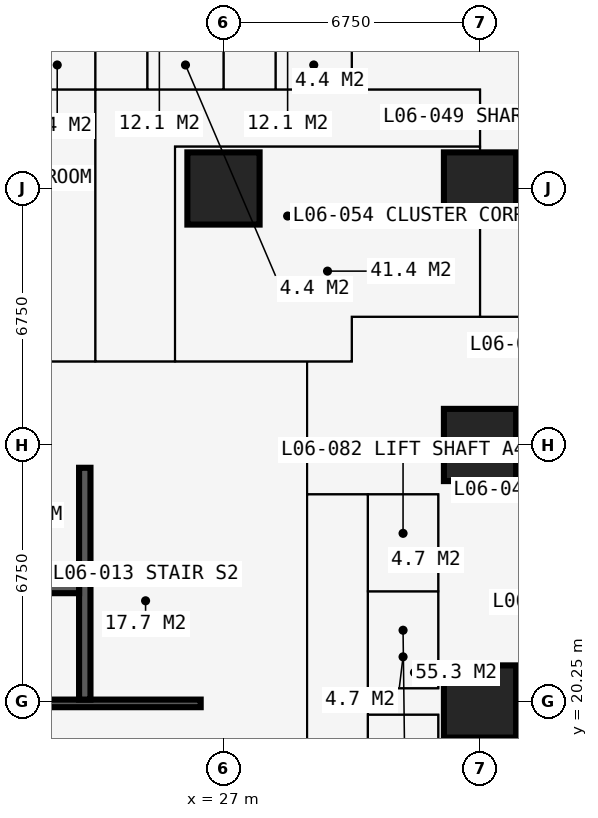
"""IFC4 building model, lengths in metres.
Left out: names, types, materials, properties, quantities, classifications, styles, units other than length and angle.
Written with IfcOpenShell. Run it as: python <this file> out.ifc"""

import sys

from ifc_helpers import new_model, si_unit, direction, frame, frame_2d, origin, origin_2d, place, context, subcontext, project, spatial, rectangle, extrude, element, fill, save


model = new_model("IFC4")
c1 = context("Model", 3, precision=1e-05, world=origin(), true_north=direction((0.0, 1.0)))
c2 = subcontext(c1, "Body", "Model", "MODEL_VIEW")
j1 = project(units=[si_unit("LENGTHUNIT", "METRE"), si_unit("PLANEANGLEUNIT", "RADIAN")], contexts=[c1])
p1 = place(None, origin())
s1 = spatial("IfcSite", under=j1, at=p1, CompositionType="ELEMENT")
p2 = place(p1, origin())
s2 = spatial("IfcBuilding", under=s1, at=p2, CompositionType="ELEMENT")
p3 = place(p2, frame((0.0, 0.0, 25.2)))
s3 = spatial("IfcBuildingStorey", under=s2, at=p3, CompositionType="ELEMENT", Elevation=25.2)
for number, where, z_axis, x_axis in (
    (1, (27.0, 33.75, 0.0), (0.0, 0.0, 1.0), (1.0, 0.0, 0.0)),
    (2, (33.75, 20.25, 0.0), (0.0, 0.0, 1.0), (1.0, 0.0, 0.0)),
    (3, (33.75, 27.0, 0.0), (0.0, 0.0, 1.0), (1.0, 0.0, 0.0)),
    (4, (33.75, 33.75, 0.0), (0.0, 0.0, 1.0), (1.0, 0.0, 0.0)),
):
    element("IfcColumn", number, at=place(p3, frame(where, z_axis=z_axis, x_axis=x_axis)), inside=s3, PredefinedType="COLUMN", context=c2, shape_type="SweptSolid", body=[
        extrude(rectangle(XDim=1.9, YDim=1.9, at=origin_2d()), origin(), (0.0, 0.0, 1.0), 3.6),
    ])
p4 = place(p3, frame((27.0, 14.1, 0.0), z_axis=(0.0, 0.0, 1.0), x_axis=(0.0, 1.0, 0.0)))
e5 = element("IfcWall", 5, at=p4, inside=s3, PredefinedType="SHEAR", context=c2, shape_type="SweptSolid", body=[
    extrude(rectangle(XDim=12.3, YDim=1.2, at=frame_2d((6.15, 0.0))), origin(), (0.0, 0.0, 1.0), 3.6),
])
p5 = place(p4, frame((3.65, 0.0, 0.0)))
e6 = element("IfcOpeningElement", 6, at=p5, cuts=e5, PredefinedType="OPENING", context=c2, shape_type="SweptSolid", body=[
    extrude(rectangle(XDim=1.2, YDim=2.2, at=frame_2d((0.6, 1.1))), frame((0.0, 0.61, 0.0), z_axis=(0.0, -1.0, 0.0), x_axis=(1.0, 0.0, 0.0)), (0.0, 0.0, 1.0), 1.22),
])
p6 = place(p3, frame((27.6, 27.0, 0.0), z_axis=(0.0, 0.0, 1.0), x_axis=(-1.0, 0.0, 0.0)))
e7 = element("IfcWall", 7, at=p6, inside=s3, PredefinedType="SHEAR", context=c2, shape_type="SweptSolid", body=[
    extrude(rectangle(XDim=14.7, YDim=1.2, at=frame_2d((7.35, 0.0))), origin(), (0.0, 0.0, 1.0), 3.6),
])
p7 = place(p6, frame((5.225, 0.0, 0.0)))
e8 = element("IfcOpeningElement", 8, at=p7, cuts=e7, PredefinedType="OPENING", context=c2, shape_type="SweptSolid", body=[
    extrude(rectangle(XDim=0.9, YDim=2.2, at=frame_2d((0.45, 1.1))), frame((0.0, 0.61, 0.0), z_axis=(0.0, -1.0, 0.0), x_axis=(1.0, 0.0, 0.0)), (0.0, 0.0, 1.0), 1.22),
])
p8 = place(p6, frame((8.2, 0.0, 0.0)))
e9 = element("IfcOpeningElement", 9, at=p8, cuts=e7, PredefinedType="OPENING", context=c2, shape_type="SweptSolid", body=[
    extrude(rectangle(XDim=1.0, YDim=2.2, at=frame_2d((0.5, 1.1))), frame((0.0, 0.61, 0.0), z_axis=(0.0, -1.0, 0.0), x_axis=(1.0, 0.0, 0.0)), (0.0, 0.0, 1.0), 1.22),
])
p9 = place(p3, frame((14.1, 20.2, 0.0), z_axis=(0.0, 0.0, 1.0), x_axis=(1.0, 0.0, 0.0)))
e10 = element("IfcWall", 10, at=p9, inside=s3, PredefinedType="SHEAR", context=c2, shape_type="SweptSolid", body=[
    extrude(rectangle(XDim=12.3, YDim=0.2, at=frame_2d((6.15, 0.0))), origin(), (0.0, 0.0, 1.0), 3.6),
])
p10 = place(p9, frame((0.35, 0.0, 0.0)))
e11 = element("IfcOpeningElement", 11, at=p10, cuts=e10, PredefinedType="OPENING", context=c2, shape_type="SweptSolid", body=[
    extrude(rectangle(XDim=1.1, YDim=2.2, at=frame_2d((0.55, 1.1))), frame((0.0, 0.11, 0.0), z_axis=(0.0, -1.0, 0.0), x_axis=(1.0, 0.0, 0.0)), (0.0, 0.0, 1.0), 0.22),
])
p11 = place(p9, frame((9.75, 0.0, 0.0)))
e12 = element("IfcOpeningElement", 12, at=p11, cuts=e10, PredefinedType="OPENING", context=c2, shape_type="SweptSolid", body=[
    extrude(rectangle(XDim=1.1, YDim=2.2, at=frame_2d((0.55, 1.1))), frame((0.0, 0.11, 0.0), z_axis=(0.0, -1.0, 0.0), x_axis=(1.0, 0.0, 0.0)), (0.0, 0.0, 1.0), 0.22),
])
p12 = place(p3, frame((23.35, 20.3, 0.0), z_axis=(0.0, 0.0, 1.0), x_axis=(0.0, 1.0, 0.0)))
e13 = element("IfcWall", 13, at=p12, inside=s3, PredefinedType="SHEAR", context=c2, shape_type="SweptSolid", body=[
    extrude(rectangle(XDim=6.1, YDim=0.3, at=frame_2d((3.05, 0.0))), origin(), (0.0, 0.0, 1.0), 3.6),
])
p13 = place(p3, frame((17.3, 23.25, 0.0), z_axis=(0.0, 0.0, 1.0), x_axis=(1.0, 0.0, 0.0)))
e14 = element("IfcWall", 14, at=p13, inside=s3, PredefinedType="SHEAR", context=c2, shape_type="SweptSolid", body=[
    extrude(rectangle(XDim=5.9, YDim=0.3, at=frame_2d((2.95, 0.0))), origin(), (0.0, 0.0, 1.0), 3.6),
])
p14 = place(p3, frame((10.125, 36.35, 0.0), z_axis=(0.0, 0.0, 1.0), x_axis=(1.0, 0.0, 0.0)))
e15 = element("IfcWall", 15, at=p14, inside=s3, PredefinedType="PARTITIONING", context=c2, shape_type="SweptSolid", body=[
    extrude(rectangle(XDim=23.625, YDim=0.1, at=frame_2d((11.812, 0.0))), origin(), (0.0, 0.0, 1.0), 3.375),
])
p15 = place(p14, frame((21.45, 0.0, 0.0)))
e16 = element("IfcOpeningElement", 16, at=p15, cuts=e15, PredefinedType="OPENING", context=c2, shape_type="SweptSolid", body=[
    extrude(rectangle(XDim=1.0, YDim=2.2, at=frame_2d((0.5, 1.1))), frame((0.0, 0.06, 0.0), z_axis=(0.0, -1.0, 0.0), x_axis=(1.0, 0.0, 0.0)), (0.0, 0.0, 1.0), 0.12),
])
p16 = place(p14, frame((17.125, 0.0, 0.0)))
e17 = element("IfcOpeningElement", 17, at=p16, cuts=e15, PredefinedType="OPENING", context=c2, shape_type="SweptSolid", body=[
    extrude(rectangle(XDim=0.95, YDim=2.2, at=frame_2d((0.475, 1.1))), frame((0.0, 0.06, 0.0), z_axis=(0.0, -1.0, 0.0), x_axis=(1.0, 0.0, 0.0)), (0.0, 0.0, 1.0), 0.12),
])
p17 = place(p14, frame((13.7, 0.0, 0.0)))
e18 = element("IfcOpeningElement", 18, at=p17, cuts=e15, PredefinedType="OPENING", context=c2, shape_type="SweptSolid", body=[
    extrude(rectangle(XDim=0.95, YDim=2.2, at=frame_2d((0.475, 1.1))), frame((0.0, 0.06, 0.0), z_axis=(0.0, -1.0, 0.0), x_axis=(1.0, 0.0, 0.0)), (0.0, 0.0, 1.0), 0.12),
])
p18 = place(p14, frame((0.2, 0.0, 0.0)))
e19 = element("IfcOpeningElement", 19, at=p18, cuts=e15, PredefinedType="OPENING", context=c2, shape_type="SweptSolid", body=[
    extrude(rectangle(XDim=0.95, YDim=2.2, at=frame_2d((0.475, 1.1))), frame((0.0, 0.06, 0.0), z_axis=(0.0, -1.0, 0.0), x_axis=(1.0, 0.0, 0.0)), (0.0, 0.0, 1.0), 0.12),
])
p19 = place(p14, frame((3.625, 0.0, 0.0)))
e20 = element("IfcOpeningElement", 20, at=p19, cuts=e15, PredefinedType="OPENING", context=c2, shape_type="SweptSolid", body=[
    extrude(rectangle(XDim=0.95, YDim=2.2, at=frame_2d((0.475, 1.1))), frame((0.0, 0.06, 0.0), z_axis=(0.0, -1.0, 0.0), x_axis=(1.0, 0.0, 0.0)), (0.0, 0.0, 1.0), 0.12),
])
p20 = place(p14, frame((7.0, 0.0, 0.0)))
e21 = element("IfcOpeningElement", 21, at=p20, cuts=e15, PredefinedType="OPENING", context=c2, shape_type="SweptSolid", body=[
    extrude(rectangle(XDim=0.95, YDim=2.2, at=frame_2d((0.475, 1.1))), frame((0.0, 0.06, 0.0), z_axis=(0.0, -1.0, 0.0), x_axis=(1.0, 0.0, 0.0)), (0.0, 0.0, 1.0), 0.12),
])
p21 = place(p14, frame((10.375, 0.0, 0.0)))
e22 = element("IfcOpeningElement", 22, at=p21, cuts=e15, PredefinedType="OPENING", context=c2, shape_type="SweptSolid", body=[
    extrude(rectangle(XDim=0.95, YDim=2.2, at=frame_2d((0.475, 1.1))), frame((0.0, 0.06, 0.0), z_axis=(0.0, -1.0, 0.0), x_axis=(1.0, 0.0, 0.0)), (0.0, 0.0, 1.0), 0.12),
])
p22 = place(p3, frame((11.3, 29.2, 0.0), z_axis=(0.0, 0.0, 1.0), x_axis=(1.0, 0.0, 0.0)))
e23 = element("IfcWall", 23, at=p22, inside=s3, PredefinedType="PARTITIONING", context=c2, shape_type="SweptSolid", body=[
    extrude(rectangle(XDim=19.075, YDim=0.15, at=frame_2d((9.538, 0.0))), origin(), (0.0, 0.0, 1.0), 3.375),
])
p23 = place(p22, frame((12.875, 0.0, 0.0)))
e24 = element("IfcOpeningElement", 24, at=p23, cuts=e23, PredefinedType="OPENING", context=c2, shape_type="SweptSolid", body=[
    extrude(rectangle(XDim=1.0, YDim=2.2, at=frame_2d((0.5, 1.1))), frame((0.0, 0.085, 0.0), z_axis=(0.0, -1.0, 0.0), x_axis=(1.0, 0.0, 0.0)), (0.0, 0.0, 1.0), 0.17),
])
p24 = place(p22, frame((10.438, 0.0, 0.0)))
e25 = element("IfcOpeningElement", 25, at=p24, cuts=e23, PredefinedType="OPENING", context=c2, shape_type="SweptSolid", body=[
    extrude(rectangle(XDim=1.0, YDim=2.2, at=frame_2d((0.5, 1.1))), frame((0.0, 0.085, 0.0), z_axis=(0.0, -1.0, 0.0), x_axis=(1.0, 0.0, 0.0)), (0.0, 0.0, 1.0), 0.17),
])
p25 = place(p22, frame((15.675, 0.0, 0.0)))
e26 = element("IfcOpeningElement", 26, at=p25, cuts=e23, PredefinedType="OPENING", context=c2, shape_type="SweptSolid", body=[
    extrude(rectangle(XDim=0.95, YDim=2.2, at=frame_2d((0.475, 1.1))), frame((0.0, 0.085, 0.0), z_axis=(0.0, -1.0, 0.0), x_axis=(1.0, 0.0, 0.0)), (0.0, 0.0, 1.0), 0.17),
])
p26 = place(p3, frame((23.625, 29.2, 0.0), z_axis=(0.0, 0.0, 1.0), x_axis=(0.0, 1.0, 0.0)))
e27 = element("IfcWall", 27, at=p26, inside=s3, PredefinedType="PARTITIONING", context=c2, shape_type="SweptSolid", body=[
    extrude(rectangle(XDim=12.034, YDim=0.15, at=frame_2d((6.017, 0.0))), origin(), (0.0, 0.0, 1.0), 3.375),
])
p27 = place(p3, frame((25.0, 36.35, 0.0), z_axis=(0.0, 0.0, 1.0), x_axis=(0.0, 1.0, 0.0)))
e28 = element("IfcWall", 28, at=p27, inside=s3, PredefinedType="PARTITIONING", context=c2, shape_type="SweptSolid", body=[
    extrude(rectangle(XDim=2.2, YDim=0.1, at=frame_2d((1.1, 0.0))), origin(), (0.0, 0.0, 1.0), 3.375),
])
p28 = place(p3, frame((25.725, 29.2, 0.0), z_axis=(0.0, 0.0, 1.0), x_axis=(0.0, 1.0, 0.0)))
e29 = element("IfcWall", 29, at=p28, inside=s3, PredefinedType="PARTITIONING", context=c2, shape_type="SweptSolid", body=[
    extrude(rectangle(XDim=5.65, YDim=0.15, at=frame_2d((2.825, 0.0))), origin(), (0.0, 0.0, 1.0), 3.375),
])
p29 = place(p3, frame((25.725, 34.85, 0.0), z_axis=(0.0, 0.0, 1.0), x_axis=(1.0, 0.0, 0.0)))
e30 = element("IfcWall", 30, at=p29, inside=s3, PredefinedType="PARTITIONING", context=c2, shape_type="SweptSolid", body=[
    extrude(rectangle(XDim=8.025, YDim=0.15, at=frame_2d((4.012, 0.0))), origin(), (0.0, 0.0, 1.0), 3.375),
])
p30 = place(p3, frame((27.0, 36.35, 0.0), z_axis=(0.0, 0.0, 1.0), x_axis=(0.0, 1.0, 0.0)))
e31 = element("IfcWall", 31, at=p30, inside=s3, PredefinedType="PARTITIONING", context=c2, shape_type="SweptSolid", body=[
    extrude(rectangle(XDim=4.884, YDim=0.175, at=frame_2d((2.442, 0.0))), origin(), (0.0, 0.0, 1.0), 2.61),
])
p31 = place(p30, frame((0.65, 0.0, 0.0)))
e32 = element("IfcOpeningElement", 32, at=p31, cuts=e31, PredefinedType="OPENING", context=c2, shape_type="SweptSolid", body=[
    extrude(rectangle(XDim=0.9, YDim=2.2, at=frame_2d((0.45, 1.1))), frame((0.0, 0.097, 0.0), z_axis=(0.0, -1.0, 0.0), x_axis=(1.0, 0.0, 0.0)), (0.0, 0.0, 1.0), 0.195),
])
p32 = place(p3, frame((28.375, 36.35, 0.0), z_axis=(0.0, 0.0, 1.0), x_axis=(0.0, 1.0, 0.0)))
e33 = element("IfcWall", 33, at=p32, inside=s3, PredefinedType="PARTITIONING", context=c2, shape_type="SweptSolid", body=[
    extrude(rectangle(XDim=2.2, YDim=0.1, at=frame_2d((1.1, 0.0))), origin(), (0.0, 0.0, 1.0), 3.375),
])
p33 = place(p32, frame((0.65, 0.0, 0.0)))
e34 = element("IfcOpeningElement", 34, at=p33, cuts=e33, PredefinedType="OPENING", context=c2, shape_type="SweptSolid", body=[
    extrude(rectangle(XDim=0.9, YDim=2.2, at=frame_2d((0.45, 1.1))), frame((0.0, 0.06, 0.0), z_axis=(0.0, -1.0, 0.0), x_axis=(1.0, 0.0, 0.0)), (0.0, 0.0, 1.0), 0.12),
])
p34 = place(p3, frame((29.2, 11.3, 0.0), z_axis=(0.0, 0.0, 1.0), x_axis=(0.0, 1.0, 0.0)))
e35 = element("IfcWall", 35, at=p34, inside=s3, PredefinedType="PARTITIONING", context=c2, shape_type="SweptSolid", body=[
    extrude(rectangle(XDim=17.9, YDim=0.2, at=frame_2d((8.95, 0.0))), origin(), (0.0, 0.0, 1.0), 3.375),
])
p35 = place(p34, frame((8.35, 0.0, 0.0)))
e36 = element("IfcOpeningElement", 36, at=p35, cuts=e35, PredefinedType="OPENING", context=c2, shape_type="SweptSolid", body=[
    extrude(rectangle(XDim=1.2, YDim=2.2, at=frame_2d((0.6, 1.1))), frame((0.0, 0.11, 0.0), z_axis=(0.0, -1.0, 0.0), x_axis=(1.0, 0.0, 0.0)), (0.0, 0.0, 1.0), 0.22),
])
p36 = place(p3, frame((29.2, 25.7, 0.0), z_axis=(0.0, 0.0, 1.0), x_axis=(1.0, 0.0, 0.0)))
e37 = element("IfcWall", 37, at=p36, inside=s3, PredefinedType="SHEAR", context=c2, shape_type="SweptSolid", body=[
    extrude(rectangle(XDim=3.45, YDim=0.1, at=frame_2d((1.725, 0.0))), origin(), (0.0, 0.0, 1.0), 3.375),
])
p37 = place(p3, frame((30.375, 29.2, 0.0), z_axis=(0.0, 0.0, 1.0), x_axis=(0.0, 1.0, 0.0)))
e38 = element("IfcWall", 38, at=p37, inside=s3, PredefinedType="PARTITIONING", context=c2, shape_type="SweptSolid", body=[
    extrude(rectangle(XDim=1.175, YDim=0.15, at=frame_2d((0.587, 0.0))), origin(), (0.0, 0.0, 1.0), 3.375),
])
p38 = place(p3, frame((30.375, 30.375, 0.0), z_axis=(0.0, 0.0, 1.0), x_axis=(1.0, 0.0, 0.0)))
e39 = element("IfcWall", 39, at=p38, inside=s3, PredefinedType="PARTITIONING", context=c2, shape_type="SweptSolid", body=[
    extrude(rectangle(XDim=10.859, YDim=0.15, at=frame_2d((5.429, 0.0))), origin(), (0.0, 0.0, 1.0), 3.375),
])
p39 = place(p3, frame((30.375, 36.35, 0.0), z_axis=(0.0, 0.0, 1.0), x_axis=(0.0, 1.0, 0.0)))
e40 = element("IfcWall", 40, at=p39, inside=s3, PredefinedType="PARTITIONING", context=c2, shape_type="SweptSolid", body=[
    extrude(rectangle(XDim=4.884, YDim=0.15, at=frame_2d((2.442, 0.0))), origin(), (0.0, 0.0, 1.0), 3.375),
])
p40 = place(p3, frame((30.8, 14.8, 0.0), z_axis=(0.0, 0.0, 1.0), x_axis=(0.0, 1.0, 0.0)))
e41 = element("IfcWall", 41, at=p40, inside=s3, PredefinedType="PARTITIONING", context=c2, shape_type="SweptSolid", body=[
    extrude(rectangle(XDim=10.9, YDim=0.15, at=frame_2d((5.45, 0.0))), origin(), (0.0, 0.0, 1.0), 3.375),
])
p41 = place(p40, frame((0.75, 0.0, 0.0)))
e42 = element("IfcOpeningElement", 42, at=p41, cuts=e41, PredefinedType="OPENING", context=c2, shape_type="SweptSolid", body=[
    extrude(rectangle(XDim=1.1, YDim=2.2, at=frame_2d((0.55, 1.1))), frame((0.0, 0.085, 0.0), z_axis=(0.0, -1.0, 0.0), x_axis=(1.0, 0.0, 0.0)), (0.0, 0.0, 1.0), 0.17),
])
p42 = place(p40, frame((3.25, 0.0, 0.0)))
e43 = element("IfcOpeningElement", 43, at=p42, cuts=e41, PredefinedType="OPENING", context=c2, shape_type="SweptSolid", body=[
    extrude(rectangle(XDim=1.1, YDim=2.2, at=frame_2d((0.55, 1.1))), frame((0.0, 0.085, 0.0), z_axis=(0.0, -1.0, 0.0), x_axis=(1.0, 0.0, 0.0)), (0.0, 0.0, 1.0), 0.17),
])
p43 = place(p40, frame((6.5, 0.0, 0.0)))
e44 = element("IfcOpeningElement", 44, at=p43, cuts=e41, PredefinedType="OPENING", context=c2, shape_type="SweptSolid", body=[
    extrude(rectangle(XDim=1.1, YDim=2.2, at=frame_2d((0.55, 1.1))), frame((0.0, 0.085, 0.0), z_axis=(0.0, -1.0, 0.0), x_axis=(1.0, 0.0, 0.0)), (0.0, 0.0, 1.0), 0.17),
])
p44 = place(p40, frame((9.05, 0.0, 0.0)))
e45 = element("IfcOpeningElement", 45, at=p44, cuts=e41, PredefinedType="OPENING", context=c2, shape_type="SweptSolid", body=[
    extrude(rectangle(XDim=1.1, YDim=2.2, at=frame_2d((0.55, 1.1))), frame((0.0, 0.085, 0.0), z_axis=(0.0, -1.0, 0.0), x_axis=(1.0, 0.0, 0.0)), (0.0, 0.0, 1.0), 0.17),
])
for number, where, z_axis, x_axis in (
    (46, (30.8, 19.9, 0.0), (0.0, 0.0, 1.0), (1.0, 0.0, 0.0)),
    (47, (30.8, 20.6, 0.0), (0.0, 0.0, 1.0), (1.0, 0.0, 0.0)),
    (48, (30.8, 23.15, 0.0), (0.0, 0.0, 1.0), (1.0, 0.0, 0.0)),
):
    element("IfcWall", number, at=place(p3, frame(where, z_axis=z_axis, x_axis=x_axis)), inside=s3, PredefinedType="SHEAR", context=c2, shape_type="SweptSolid", body=[
        extrude(rectangle(XDim=1.85, YDim=0.1, at=frame_2d((0.925, 0.0))), origin(), (0.0, 0.0, 1.0), 3.375),
    ])
p45 = place(p3, frame((32.65, 10.6, 0.0), z_axis=(0.0, 0.0, 1.0), x_axis=(0.0, 1.0, 0.0)))
e49 = element("IfcWall", 49, at=p45, inside=s3, PredefinedType="SHEAR", context=c2, shape_type="SweptSolid", body=[
    extrude(rectangle(XDim=9.3, YDim=0.1, at=frame_2d((4.65, 0.0))), origin(), (0.0, 0.0, 1.0), 3.375),
])
p46 = place(p45, frame((0.5, 0.0, 0.0)))
e50 = element("IfcOpeningElement", 50, at=p46, cuts=e49, PredefinedType="OPENING", context=c2, shape_type="SweptSolid", body=[
    extrude(rectangle(XDim=1.0, YDim=2.2, at=frame_2d((0.5, 1.1))), frame((0.0, 0.06, 0.0), z_axis=(0.0, -1.0, 0.0), x_axis=(1.0, 0.0, 0.0)), (0.0, 0.0, 1.0), 0.12),
])
p47 = place(p3, frame((32.65, 20.6, 0.0), z_axis=(0.0, 0.0, 1.0), x_axis=(0.0, 1.0, 0.0)))
e51 = element("IfcWall", 51, at=p47, inside=s3, PredefinedType="PARTITIONING", context=c2, shape_type="SweptSolid", body=[
    extrude(rectangle(XDim=5.1, YDim=0.15, at=frame_2d((2.55, 0.0))), origin(), (0.0, 0.0, 1.0), 3.375),
])
p48 = place(p3, frame((33.75, 30.375, 0.0), z_axis=(0.0, 0.0, 1.0), x_axis=(0.0, 1.0, 0.0)))
e52 = element("IfcWall", 52, at=p48, inside=s3, PredefinedType="PARTITIONING", context=c2, shape_type="SweptSolid", body=[
    extrude(rectangle(XDim=5.975, YDim=0.15, at=frame_2d((2.988, 0.0))), origin(), (0.0, 0.0, 1.0), 2.877),
])
p49 = place(p11, origin())
e53 = element("IfcDoor", 53, at=p49, inside=s3, OperationType="SINGLE_SWING_LEFT", PredefinedType="DOOR", context=c2, shape_type="SweptSolid", body=[
    extrude(rectangle(XDim=1.1, YDim=2.2, at=frame_2d((0.55, 1.1))), frame((0.0, 0.025, 0.0), z_axis=(0.0, -1.0, 0.0), x_axis=(1.0, 0.0, 0.0)), (0.0, 0.0, 1.0), 0.05),
])
fill(e12, e53)
p50 = place(p15, origin())
e54 = element("IfcDoor", 54, at=p50, inside=s3, OperationType="SINGLE_SWING_LEFT", PredefinedType="DOOR", context=c2, shape_type="SweptSolid", body=[
    extrude(rectangle(XDim=1.0, YDim=2.2, at=frame_2d((0.5, 1.1))), frame((0.0, 0.025, 0.0), z_axis=(0.0, -1.0, 0.0), x_axis=(1.0, 0.0, 0.0)), (0.0, 0.0, 1.0), 0.05),
])
fill(e16, e54)
p51 = place(p16, origin())
e55 = element("IfcDoor", 55, at=p51, inside=s3, OperationType="SINGLE_SWING_LEFT", PredefinedType="DOOR", context=c2, shape_type="SweptSolid", body=[
    extrude(rectangle(XDim=0.95, YDim=2.2, at=frame_2d((0.475, 1.1))), frame((0.0, 0.025, 0.0), z_axis=(0.0, -1.0, 0.0), x_axis=(1.0, 0.0, 0.0)), (0.0, 0.0, 1.0), 0.05),
])
fill(e17, e55)
p52 = place(p33, origin())
e56 = element("IfcDoor", 56, at=p52, inside=s3, OperationType="SINGLE_SWING_RIGHT", PredefinedType="DOOR", context=c2, shape_type="SweptSolid", body=[
    extrude(rectangle(XDim=0.9, YDim=2.2, at=frame_2d((0.45, 1.1))), frame((0.0, 0.025, 0.0), z_axis=(0.0, -1.0, 0.0), x_axis=(1.0, 0.0, 0.0)), (0.0, 0.0, 1.0), 0.05),
])
fill(e34, e56)
p53 = place(p17, origin())
e57 = element("IfcDoor", 57, at=p53, inside=s3, OperationType="SINGLE_SWING_LEFT", PredefinedType="DOOR", context=c2, shape_type="SweptSolid", body=[
    extrude(rectangle(XDim=0.95, YDim=2.2, at=frame_2d((0.475, 1.1))), frame((0.0, 0.025, 0.0), z_axis=(0.0, -1.0, 0.0), x_axis=(1.0, 0.0, 0.0)), (0.0, 0.0, 1.0), 0.05),
])
fill(e18, e57)
p54 = place(p31, origin())
e58 = element("IfcDoor", 58, at=p54, inside=s3, OperationType="SINGLE_SWING_RIGHT", PredefinedType="DOOR", context=c2, shape_type="SweptSolid", body=[
    extrude(rectangle(XDim=0.9, YDim=2.2, at=frame_2d((0.45, 1.1))), frame((0.0, 0.025, 0.0), z_axis=(0.0, -1.0, 0.0), x_axis=(1.0, 0.0, 0.0)), (0.0, 0.0, 1.0), 0.05),
])
fill(e32, e58)
p55 = place(p23, origin())
e59 = element("IfcDoor", 59, at=p55, inside=s3, OperationType="SINGLE_SWING_LEFT", PredefinedType="DOOR", context=c2, shape_type="SweptSolid", body=[
    extrude(rectangle(XDim=1.0, YDim=2.2, at=frame_2d((0.5, 1.1))), frame((0.0, 0.025, 0.0), z_axis=(0.0, -1.0, 0.0), x_axis=(1.0, 0.0, 0.0)), (0.0, 0.0, 1.0), 0.05),
])
fill(e24, e59)
p56 = place(p24, origin())
e60 = element("IfcDoor", 60, at=p56, inside=s3, OperationType="SINGLE_SWING_LEFT", PredefinedType="DOOR", context=c2, shape_type="SweptSolid", body=[
    extrude(rectangle(XDim=1.0, YDim=2.2, at=frame_2d((0.5, 1.1))), frame((0.0, 0.025, 0.0), z_axis=(0.0, -1.0, 0.0), x_axis=(1.0, 0.0, 0.0)), (0.0, 0.0, 1.0), 0.05),
])
fill(e25, e60)
p57 = place(p25, origin())
e61 = element("IfcDoor", 61, at=p57, inside=s3, OperationType="SINGLE_SWING_LEFT", PredefinedType="DOOR", context=c2, shape_type="SweptSolid", body=[
    extrude(rectangle(XDim=0.95, YDim=2.2, at=frame_2d((0.475, 1.1))), frame((0.0, 0.025, 0.0), z_axis=(0.0, -1.0, 0.0), x_axis=(1.0, 0.0, 0.0)), (0.0, 0.0, 1.0), 0.05),
])
fill(e26, e61)
p58 = place(p43, origin())
e62 = element("IfcDoor", 62, at=p58, inside=s3, OperationType="DOUBLE_DOOR_SLIDING", PredefinedType="DOOR", context=c2, shape_type="SweptSolid", body=[
    extrude(rectangle(XDim=1.1, YDim=2.2, at=frame_2d((0.55, 1.1))), frame((0.0, 0.025, 0.0), z_axis=(0.0, -1.0, 0.0), x_axis=(1.0, 0.0, 0.0)), (0.0, 0.0, 1.0), 0.05),
])
fill(e44, e62)
p59 = place(p44, origin())
e63 = element("IfcDoor", 63, at=p59, inside=s3, OperationType="DOUBLE_DOOR_SLIDING", PredefinedType="DOOR", context=c2, shape_type="SweptSolid", body=[
    extrude(rectangle(XDim=1.1, YDim=2.2, at=frame_2d((0.55, 1.1))), frame((0.0, 0.025, 0.0), z_axis=(0.0, -1.0, 0.0), x_axis=(1.0, 0.0, 0.0)), (0.0, 0.0, 1.0), 0.05),
])
fill(e45, e63)
p60 = place(p35, origin())
e64 = element("IfcDoor", 64, at=p60, inside=s3, OperationType="DOUBLE_DOOR_SINGLE_SWING", PredefinedType="DOOR", context=c2, shape_type="SweptSolid", body=[
    extrude(rectangle(XDim=1.2, YDim=2.2, at=frame_2d((0.6, 1.1))), frame((0.0, 0.025, 0.0), z_axis=(0.0, -1.0, 0.0), x_axis=(1.0, 0.0, 0.0)), (0.0, 0.0, 1.0), 0.05),
])
fill(e36, e64)
save(model, sys.argv[1])
